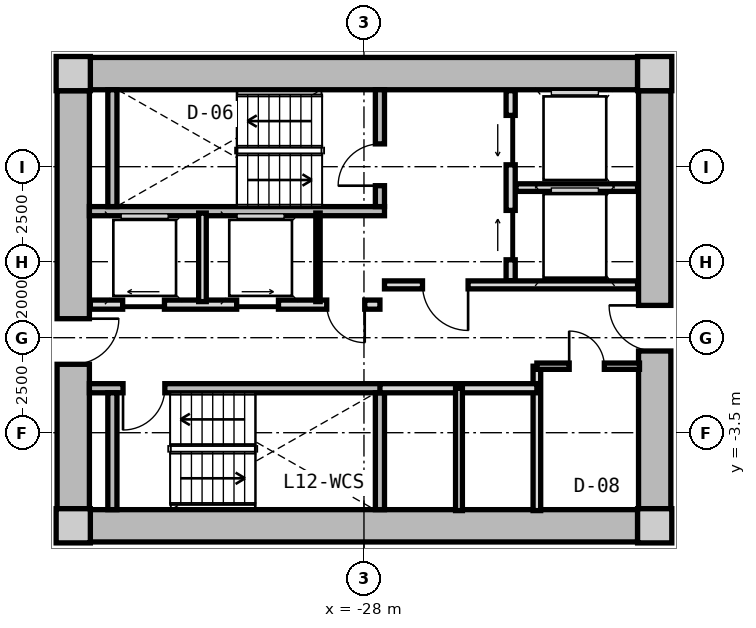
"""IFC4 building model, lengths in metres.
Left out: names, types, materials, properties, quantities, classifications, styles, units other than length and angle.
Written with IfcOpenShell. Run it as: python <this file> out.ifc"""

import sys

from ifc_helpers import new_model, si_unit, direction, frame, frame_2d, origin, origin_2d, place, context, subcontext, project, spatial, rectangle, extrude, source, transform, mapped, element, fill, save


model = new_model("IFC4")
c1 = context("Model", 3, precision=1e-05, world=origin(), true_north=direction((0.0, 1.0)))
c2 = subcontext(c1, "Body", "Model", "MODEL_VIEW")
j1 = project(units=[si_unit("LENGTHUNIT", "METRE"), si_unit("PLANEANGLEUNIT", "RADIAN")], contexts=[c1])
p1 = place(None, origin())
s1 = spatial("IfcSite", under=j1, at=p1, CompositionType="ELEMENT")
p2 = place(p1, origin())
s2 = spatial("IfcBuilding", under=s1, at=p2, CompositionType="ELEMENT")
p3 = place(p2, frame((0.0, 0.0, 42.95)))
s3 = spatial("IfcBuildingStorey", under=s2, at=p3, CompositionType="ELEMENT", Elevation=42.95)
m1 = source(origin(), c2, "Body", "SweptSolid", [
    extrude(rectangle(XDim=0.9, YDim=0.9, at=origin_2d()), origin(), (0.0, 0.0, 1.0), 3.05),
])
for number, where, z_axis, x_axis in (
    (1, (-35.65, -5.95, 0.0), (0.0, 0.0, 1.0), (1.0, 0.0, 0.0)),
    (2, (-20.35, -5.95, 0.0), (0.0, 0.0, 1.0), (1.0, 0.0, 0.0)),
    (3, (-20.35, 5.95, 0.0), (0.0, 0.0, 1.0), (1.0, 0.0, 0.0)),
    (4, (-35.65, 5.95, 0.0), (0.0, 0.0, 1.0), (1.0, 0.0, 0.0)),
):
    element("IfcColumn", number, at=place(p3, frame(where, z_axis=z_axis, x_axis=x_axis)), inside=s3, PredefinedType="COLUMN", context=c2, shape_type="MappedRepresentation", body=[
        mapped(m1, transform((0.0, 0.0, 0.0), x_axis=(1.0, 0.0, 0.0), y_axis=(0.0, 1.0, 0.0), z_axis=(0.0, 0.0, 1.0), scale=1.0)),
    ])
m2 = source(origin(), c2, "Body", "SweptSolid", [
    extrude(rectangle(XDim=14.4, YDim=0.85, at=frame_2d((7.2, 0.0))), origin(), (0.0, 0.0, 1.0), 2.79),
])
for number, where, z_axis, x_axis in (
    (5, (-35.2, 5.95, 0.0), (0.0, 0.0, 1.0), (1.0, 0.0, 0.0)),
    (6, (-20.8, -5.95, 0.0), (0.0, 0.0, 1.0), (-1.0, 0.0, 0.0)),
):
    element("IfcWall", number, at=place(p3, frame(where, z_axis=z_axis, x_axis=x_axis)), inside=s3, PredefinedType="SHEAR", context=c2, shape_type="MappedRepresentation", body=[
        mapped(m2, transform((0.0, 0.0, 0.0), x_axis=(1.0, 0.0, 0.0), y_axis=(0.0, 1.0, 0.0), z_axis=(0.0, 0.0, 1.0), scale=1.0)),
    ])
m3 = source(origin(), c2, "Body", "SweptSolid", [
    extrude(rectangle(XDim=11.0, YDim=0.85, at=frame_2d((5.5, 0.0))), origin(), (0.0, 0.0, 1.0), 2.79),
])
p4 = place(p3, frame((-35.65, -5.5, 0.0), z_axis=(0.0, 0.0, 1.0), x_axis=(0.0, 1.0, 0.0)))
e7 = element("IfcWall", 7, at=p4, inside=s3, PredefinedType="SHEAR", context=c2, shape_type="MappedRepresentation", body=[
    mapped(m3, transform((0.0, 0.0, 0.0), x_axis=(1.0, 0.0, 0.0), y_axis=(0.0, 1.0, 0.0), z_axis=(0.0, 0.0, 1.0), scale=1.0)),
])
p5 = place(p4, frame((3.8, 0.0, 0.0)))
e8 = element("IfcOpeningElement", 8, at=p5, cuts=e7, PredefinedType="OPENING", context=c2, shape_type="SweptSolid", body=[
    extrude(rectangle(XDim=1.2, YDim=2.15, at=frame_2d((0.6, 1.075))), frame((0.0, 0.435, 0.0), z_axis=(0.0, -1.0, 0.0), x_axis=(1.0, 0.0, 0.0)), (0.0, 0.0, 1.0), 0.87),
])
p6 = place(p3, frame((-20.35, 5.5, 0.0), z_axis=(0.0, 0.0, 1.0), x_axis=(0.0, -1.0, 0.0)))
e9 = element("IfcWall", 9, at=p6, inside=s3, PredefinedType="SHEAR", context=c2, shape_type="MappedRepresentation", body=[
    mapped(m3, transform((0.0, 0.0, 0.0), x_axis=(1.0, 0.0, 0.0), y_axis=(0.0, 1.0, 0.0), z_axis=(0.0, 0.0, 1.0), scale=1.0)),
])
p7 = place(p6, frame((5.65, 0.0, 0.0)))
e10 = element("IfcOpeningElement", 10, at=p7, cuts=e9, PredefinedType="OPENING", context=c2, shape_type="SweptSolid", body=[
    extrude(rectangle(XDim=1.2, YDim=2.15, at=frame_2d((0.6, 1.075))), frame((0.0, 0.435, 0.0), z_axis=(0.0, -1.0, 0.0), x_axis=(1.0, 0.0, 0.0)), (0.0, 0.0, 1.0), 0.87),
])
m4 = source(origin(), c2, "Body", "SweptSolid", [
    extrude(rectangle(XDim=7.765, YDim=0.24, at=frame_2d((3.883, 0.0))), origin(), (0.0, 0.0, 1.0), 2.79),
])
p8 = place(p3, frame((-35.225, 2.33, 0.0), z_axis=(0.0, 0.0, 1.0), x_axis=(1.0, 0.0, 0.0)))
e11 = element("IfcWall", 11, at=p8, inside=s3, PredefinedType="PARTITIONING", context=c2, shape_type="MappedRepresentation", body=[
    mapped(m4, transform((0.0, 0.0, 0.0), x_axis=(1.0, 0.0, 0.0), y_axis=(0.0, 1.0, 0.0), z_axis=(0.0, 0.0, 1.0), scale=1.0)),
])
m5 = source(origin(), c2, "Body", "SweptSolid", [
    extrude(rectangle(XDim=3.075, YDim=0.24, at=frame_2d((1.538, 0.0))), origin(), (0.0, 0.0, 1.0), 2.79),
])
p9 = place(p3, frame((-34.62, 2.45, 0.0), z_axis=(0.0, 0.0, 1.0), x_axis=(0.0, 1.0, 0.0)))
e12 = element("IfcWall", 12, at=p9, inside=s3, PredefinedType="PARTITIONING", context=c2, shape_type="MappedRepresentation", body=[
    mapped(m5, transform((0.0, 0.0, 0.0), x_axis=(1.0, 0.0, 0.0), y_axis=(0.0, 1.0, 0.0), z_axis=(0.0, 0.0, 1.0), scale=1.0)),
])
p10 = place(p3, frame((-27.58, 2.45, 0.0), z_axis=(0.0, 0.0, 1.0), x_axis=(0.0, 1.0, 0.0)))
e13 = element("IfcWall", 13, at=p10, inside=s3, PredefinedType="PARTITIONING", context=c2, shape_type="MappedRepresentation", body=[
    mapped(m5, transform((0.0, 0.0, 0.0), x_axis=(1.0, 0.0, 0.0), y_axis=(0.0, 1.0, 0.0), z_axis=(0.0, 0.0, 1.0), scale=1.0)),
])
p11 = place(p10, frame((0.55, 0.0, 0.0)))
e14 = element("IfcOpeningElement", 14, at=p11, cuts=e13, PredefinedType="OPENING", context=c2, shape_type="SweptSolid", body=[
    extrude(rectangle(XDim=1.1, YDim=2.15, at=frame_2d((0.55, 1.075))), frame((0.0, 0.13, 0.0), z_axis=(0.0, -1.0, 0.0), x_axis=(1.0, 0.0, 0.0)), (0.0, 0.0, 1.0), 0.26),
])
p12 = place(p3, frame((-35.225, -2.33, 0.0), z_axis=(0.0, 0.0, 1.0), x_axis=(1.0, 0.0, 0.0)))
e15 = element("IfcWall", 15, at=p12, inside=s3, PredefinedType="PARTITIONING", context=c2, shape_type="MappedRepresentation", body=[
    mapped(m4, transform((0.0, 0.0, 0.0), x_axis=(1.0, 0.0, 0.0), y_axis=(0.0, 1.0, 0.0), z_axis=(0.0, 0.0, 1.0), scale=1.0)),
])
p13 = place(p12, frame((0.885, 0.0, 0.0)))
e16 = element("IfcOpeningElement", 16, at=p13, cuts=e15, PredefinedType="OPENING", context=c2, shape_type="SweptSolid", body=[
    extrude(rectangle(XDim=1.1, YDim=2.15, at=frame_2d((0.55, 1.075))), frame((0.0, 0.13, 0.0), z_axis=(0.0, -1.0, 0.0), x_axis=(1.0, 0.0, 0.0)), (0.0, 0.0, 1.0), 0.26),
])
for number, where, z_axis, x_axis in (
    (17, (-34.62, -5.525, 0.0), (0.0, 0.0, 1.0), (0.0, 1.0, 0.0)),
    (18, (-27.58, -5.525, 0.0), (0.0, 0.0, 1.0), (0.0, 1.0, 0.0)),
):
    element("IfcWall", number, at=place(p3, frame(where, z_axis=z_axis, x_axis=x_axis)), inside=s3, PredefinedType="PARTITIONING", context=c2, shape_type="MappedRepresentation", body=[
        mapped(m5, transform((0.0, 0.0, 0.0), x_axis=(1.0, 0.0, 0.0), y_axis=(0.0, 1.0, 0.0), z_axis=(0.0, 0.0, 1.0), scale=1.0)),
    ])
m6 = source(origin(), c2, "Body", "SweptSolid", [
    extrude(rectangle(XDim=5.0, YDim=0.24, at=frame_2d((2.5, 0.0))), origin(), (0.0, 0.0, 1.0), 2.775),
])
p14 = place(p3, frame((-24.14, 0.5, 0.0), z_axis=(0.0, 0.0, 1.0), x_axis=(0.0, 1.0, 0.0)))
e19 = element("IfcWall", 19, at=p14, inside=s3, PredefinedType="PARTITIONING", context=c2, shape_type="MappedRepresentation", body=[
    mapped(m6, transform((0.0, 0.0, 0.0), x_axis=(1.0, 0.0, 0.0), y_axis=(0.0, 1.0, 0.0), z_axis=(0.0, 0.0, 1.0), scale=1.0)),
])
p15 = place(p14, frame((3.05, 0.0, 0.0)))
e20 = element("IfcOpeningElement", 20, at=p15, cuts=e19, PredefinedType="OPENING", context=c2, shape_type="SweptSolid", body=[
    extrude(rectangle(XDim=1.3, YDim=2.2, at=frame_2d((0.65, 1.1))), frame((0.0, 0.13, 0.0), z_axis=(0.0, -1.0, 0.0), x_axis=(1.0, 0.0, 0.0)), (0.0, 0.0, 1.0), 0.26),
])
p16 = place(p14, frame((0.55, 0.0, 0.0)))
e21 = element("IfcOpeningElement", 21, at=p16, cuts=e19, PredefinedType="OPENING", context=c2, shape_type="SweptSolid", body=[
    extrude(rectangle(XDim=1.3, YDim=2.2, at=frame_2d((0.65, 1.1))), frame((0.0, 0.13, 0.0), z_axis=(0.0, -1.0, 0.0), x_axis=(1.0, 0.0, 0.0)), (0.0, 0.0, 1.0), 0.26),
])
m7 = source(origin(), c2, "Body", "SweptSolid", [
    extrude(rectangle(XDim=3.2, YDim=0.2, at=frame_2d((1.6, 0.0))), origin(), (0.0, 0.0, 1.0), 2.775),
])
p17 = place(p3, frame((-24.0, 2.95, 0.0), z_axis=(0.0, 0.0, 1.0), x_axis=(1.0, 0.0, 0.0)))
e22 = element("IfcWall", 22, at=p17, inside=s3, PredefinedType="PARTITIONING", context=c2, shape_type="MappedRepresentation", body=[
    mapped(m7, transform((0.0, 0.0, 0.0), x_axis=(1.0, 0.0, 0.0), y_axis=(0.0, 1.0, 0.0), z_axis=(0.0, 0.0, 1.0), scale=1.0)),
])
m8 = source(origin(), c2, "Body", "SweptSolid", [
    extrude(rectangle(XDim=6.66, YDim=0.21, at=frame_2d((3.33, 0.0))), origin(), (0.0, 0.0, 1.0), 2.775),
])
p18 = place(p3, frame((-27.46, 0.39, 0.0), z_axis=(0.0, 0.0, 1.0), x_axis=(1.0, 0.0, 0.0)))
e23 = element("IfcWall", 23, at=p18, inside=s3, PredefinedType="PARTITIONING", context=c2, shape_type="MappedRepresentation", body=[
    mapped(m8, transform((0.0, 0.0, 0.0), x_axis=(1.0, 0.0, 0.0), y_axis=(0.0, 1.0, 0.0), z_axis=(0.0, 0.0, 1.0), scale=1.0)),
])
p19 = place(p18, frame((1.0, 0.0, 0.0)))
e24 = element("IfcOpeningElement", 24, at=p19, cuts=e23, PredefinedType="OPENING", context=c2, shape_type="SweptSolid", body=[
    extrude(rectangle(XDim=1.2, YDim=2.15, at=frame_2d((0.6, 1.075))), frame((0.0, 0.115, 0.0), z_axis=(0.0, -1.0, 0.0), x_axis=(1.0, 0.0, 0.0)), (0.0, 0.0, 1.0), 0.23),
])
m9 = source(origin(), c2, "Body", "SweptSolid", [
    extrude(rectangle(XDim=7.62, YDim=0.24, at=frame_2d((3.81, 0.0))), origin(), (0.0, 0.0, 1.0), 2.775),
])
p20 = place(p3, frame((-35.2, -0.13, 0.0), z_axis=(0.0, 0.0, 1.0), x_axis=(1.0, 0.0, 0.0)))
e25 = element("IfcWall", 25, at=p20, inside=s3, PredefinedType="PARTITIONING", context=c2, shape_type="MappedRepresentation", body=[
    mapped(m9, transform((0.0, 0.0, 0.0), x_axis=(1.0, 0.0, 0.0), y_axis=(0.0, 1.0, 0.0), z_axis=(0.0, 0.0, 1.0), scale=1.0)),
])
p21 = place(p20, frame((6.22, 0.0, 0.0)))
e26 = element("IfcOpeningElement", 26, at=p21, cuts=e25, PredefinedType="OPENING", context=c2, shape_type="SweptSolid", body=[
    extrude(rectangle(XDim=1.0, YDim=2.1, at=frame_2d((0.5, 1.05))), frame((0.0, 0.13, 0.0), z_axis=(0.0, -1.0, 0.0), x_axis=(1.0, 0.0, 0.0)), (0.0, 0.0, 1.0), 0.26),
])
p22 = place(p20, frame((0.85, 0.0, 0.0)))
e27 = element("IfcOpeningElement", 27, at=p22, cuts=e25, PredefinedType="OPENING", context=c2, shape_type="SweptSolid", body=[
    extrude(rectangle(XDim=1.1, YDim=2.2, at=frame_2d((0.55, 1.1))), frame((0.0, 0.13, 0.0), z_axis=(0.0, -1.0, 0.0), x_axis=(1.0, 0.0, 0.0)), (0.0, 0.0, 1.0), 0.26),
])
p23 = place(p20, frame((3.85, 0.0, 0.0)))
e28 = element("IfcOpeningElement", 28, at=p23, cuts=e25, PredefinedType="OPENING", context=c2, shape_type="SweptSolid", body=[
    extrude(rectangle(XDim=1.1, YDim=2.2, at=frame_2d((0.55, 1.1))), frame((0.0, 0.13, 0.0), z_axis=(0.0, -1.0, 0.0), x_axis=(1.0, 0.0, 0.0)), (0.0, 0.0, 1.0), 0.26),
])
m10 = source(origin(), c2, "Body", "SweptSolid", [
    extrude(rectangle(XDim=2.33, YDim=0.115, at=frame_2d((1.165, 0.0))), origin(), (0.0, 0.0, 1.0), 2.775),
])
p24 = place(p3, frame((-29.21, -0.05, 0.0), z_axis=(0.0, 0.0, 1.0), x_axis=(0.0, 1.0, 0.0)))
e29 = element("IfcWall", 29, at=p24, inside=s3, PredefinedType="PARTITIONING", context=c2, shape_type="MappedRepresentation", body=[
    mapped(m10, transform((0.0, 0.0, 0.0), x_axis=(1.0, 0.0, 0.0), y_axis=(0.0, 1.0, 0.0), z_axis=(0.0, 0.0, 1.0), scale=1.0)),
])
m11 = source(origin(), c2, "Body", "SweptSolid", [
    extrude(rectangle(XDim=2.33, YDim=0.2, at=frame_2d((1.165, 0.0))), origin(), (0.0, 0.0, 1.0), 2.775),
])
p25 = place(p3, frame((-32.25, -0.05, 0.0), z_axis=(0.0, 0.0, 1.0), x_axis=(0.0, 1.0, 0.0)))
e30 = element("IfcWall", 30, at=p25, inside=s3, PredefinedType="PARTITIONING", context=c2, shape_type="MappedRepresentation", body=[
    mapped(m11, transform((0.0, 0.0, 0.0), x_axis=(1.0, 0.0, 0.0), y_axis=(0.0, 1.0, 0.0), z_axis=(0.0, 0.0, 1.0), scale=1.0)),
])
m12 = source(origin(), c2, "Body", "SweptSolid", [
    extrude(rectangle(XDim=3.8, YDim=0.2, at=frame_2d((1.9, 0.0))), origin(), (0.0, 0.0, 1.0), 2.775),
])
p26 = place(p3, frame((-23.45, -5.55, 0.0), z_axis=(0.0, 0.0, 1.0), x_axis=(0.0, 1.0, 0.0)))
e31 = element("IfcWall", 31, at=p26, inside=s3, PredefinedType="PARTITIONING", context=c2, shape_type="MappedRepresentation", body=[
    mapped(m12, transform((0.0, 0.0, 0.0), x_axis=(1.0, 0.0, 0.0), y_axis=(0.0, 1.0, 0.0), z_axis=(0.0, 0.0, 1.0), scale=1.0)),
])
m13 = source(origin(), c2, "Body", "SweptSolid", [
    extrude(rectangle(XDim=4.13, YDim=0.24, at=frame_2d((2.065, 0.0))), origin(), (0.0, 0.0, 1.0), 2.775),
])
p27 = place(p3, frame((-27.58, -2.33, 0.0), z_axis=(0.0, 0.0, 1.0), x_axis=(1.0, 0.0, 0.0)))
e32 = element("IfcWall", 32, at=p27, inside=s3, PredefinedType="PARTITIONING", context=c2, shape_type="MappedRepresentation", body=[
    mapped(m13, transform((0.0, 0.0, 0.0), x_axis=(1.0, 0.0, 0.0), y_axis=(0.0, 1.0, 0.0), z_axis=(0.0, 0.0, 1.0), scale=1.0)),
])
m14 = source(origin(), c2, "Body", "SweptSolid", [
    extrude(rectangle(XDim=3.22, YDim=0.18, at=frame_2d((1.61, 0.0))), origin(), (0.0, 0.0, 1.0), 2.775),
])
p28 = place(p3, frame((-25.5, -5.55, 0.0), z_axis=(0.0, 0.0, 1.0), x_axis=(0.0, 1.0, 0.0)))
e33 = element("IfcWall", 33, at=p28, inside=s3, PredefinedType="PARTITIONING", context=c2, shape_type="MappedRepresentation", body=[
    mapped(m14, transform((0.0, 0.0, 0.0), x_axis=(1.0, 0.0, 0.0), y_axis=(0.0, 1.0, 0.0), z_axis=(0.0, 0.0, 1.0), scale=1.0)),
])
m15 = source(origin(), c2, "Body", "SweptSolid", [
    extrude(rectangle(XDim=2.7, YDim=0.165, at=frame_2d((1.35, 0.0))), origin(), (0.0, 0.0, 1.0), 2.775),
])
p29 = place(p3, frame((-23.45, -1.75, 0.0), z_axis=(0.0, 0.0, 1.0), x_axis=(1.0, 0.0, 0.0)))
e34 = element("IfcWall", 34, at=p29, inside=s3, PredefinedType="PARTITIONING", context=c2, shape_type="MappedRepresentation", body=[
    mapped(m15, transform((0.0, 0.0, 0.0), x_axis=(1.0, 0.0, 0.0), y_axis=(0.0, 1.0, 0.0), z_axis=(0.0, 0.0, 1.0), scale=1.0)),
])
p30 = place(p29, frame((0.85, 0.0, 0.0)))
e35 = element("IfcOpeningElement", 35, at=p30, cuts=e34, PredefinedType="OPENING", context=c2, shape_type="SweptSolid", body=[
    extrude(rectangle(XDim=0.925, YDim=2.1, at=frame_2d((0.462, 1.05))), frame((0.0, 0.093, 0.0), z_axis=(0.0, -1.0, 0.0), x_axis=(1.0, 0.0, 0.0)), (0.0, 0.0, 1.0), 0.185),
])
m16 = source(origin(), c2, "Body", "SweptSolid", [
    extrude(rectangle(XDim=1.1, YDim=2.15, at=frame_2d((0.55, 1.075))), frame((0.0, 0.025, 0.0), z_axis=(0.0, -1.0, 0.0), x_axis=(1.0, 0.0, 0.0)), (0.0, 0.0, 1.0), 0.05),
])
p31 = place(p11, origin())
e36 = element("IfcDoor", 36, at=p31, inside=s3, OperationType="SINGLE_SWING_LEFT", PredefinedType="DOOR", context=c2, shape_type="MappedRepresentation", body=[
    mapped(m16, transform((0.0, 0.0, 0.0), x_axis=(1.0, 0.0, 0.0), y_axis=(0.0, 1.0, 0.0), z_axis=(0.0, 0.0, 1.0), scale=1.0)),
])
fill(e14, e36)
p32 = place(p13, frame((1.1, 0.0, 0.0), z_axis=(0.0, 0.0, 1.0), x_axis=(-1.0, 0.0, 0.0)))
e37 = element("IfcDoor", 37, at=p32, inside=s3, OperationType="SINGLE_SWING_RIGHT", PredefinedType="DOOR", context=c2, shape_type="MappedRepresentation", body=[
    mapped(m16, transform((0.0, 0.0, 0.0), x_axis=(1.0, 0.0, 0.0), y_axis=(0.0, 1.0, 0.0), z_axis=(0.0, 0.0, 1.0), scale=1.0)),
])
fill(e16, e37)
m17 = source(origin(), c2, "Body", "SweptSolid", [
    extrude(rectangle(XDim=1.3, YDim=2.2, at=frame_2d((0.65, 1.1))), frame((0.0, 0.025, 0.0), z_axis=(0.0, -1.0, 0.0), x_axis=(1.0, 0.0, 0.0)), (0.0, 0.0, 1.0), 0.05),
])
p33 = place(p15, origin())
e38 = element("IfcDoor", 38, at=p33, inside=s3, OperationType="SLIDING_TO_LEFT", PredefinedType="DOOR", context=c2, shape_type="MappedRepresentation", body=[
    mapped(m17, transform((0.0, 0.0, 0.0), x_axis=(1.0, 0.0, 0.0), y_axis=(0.0, 1.0, 0.0), z_axis=(0.0, 0.0, 1.0), scale=1.0)),
])
fill(e20, e38)
p34 = place(p16, origin())
e39 = element("IfcDoor", 39, at=p34, inside=s3, OperationType="SLIDING_TO_RIGHT", PredefinedType="DOOR", context=c2, shape_type="MappedRepresentation", body=[
    mapped(m17, transform((0.0, 0.0, 0.0), x_axis=(1.0, 0.0, 0.0), y_axis=(0.0, 1.0, 0.0), z_axis=(0.0, 0.0, 1.0), scale=1.0)),
])
fill(e21, e39)
m18 = source(origin(), c2, "Body", "SweptSolid", [
    extrude(rectangle(XDim=1.2, YDim=2.15, at=frame_2d((0.6, 1.075))), frame((0.0, 0.025, 0.0), z_axis=(0.0, -1.0, 0.0), x_axis=(1.0, 0.0, 0.0)), (0.0, 0.0, 1.0), 0.05),
])
p35 = place(p19, frame((1.2, 0.0, 0.0), z_axis=(0.0, 0.0, 1.0), x_axis=(-1.0, 0.0, 0.0)))
e40 = element("IfcDoor", 40, at=p35, inside=s3, OperationType="SINGLE_SWING_LEFT", PredefinedType="DOOR", context=c2, shape_type="MappedRepresentation", body=[
    mapped(m18, transform((0.0, 0.0, 0.0), x_axis=(1.0, 0.0, 0.0), y_axis=(0.0, 1.0, 0.0), z_axis=(0.0, 0.0, 1.0), scale=1.0)),
])
fill(e24, e40)
p36 = place(p5, frame((1.2, 0.0, 0.0), z_axis=(0.0, 0.0, 1.0), x_axis=(-1.0, 0.0, 0.0)))
e41 = element("IfcDoor", 41, at=p36, inside=s3, OperationType="SINGLE_SWING_LEFT", PredefinedType="DOOR", context=c2, shape_type="MappedRepresentation", body=[
    mapped(m18, transform((0.0, 0.0, 0.0), x_axis=(1.0, 0.0, 0.0), y_axis=(0.0, 1.0, 0.0), z_axis=(0.0, 0.0, 1.0), scale=1.0)),
])
fill(e8, e41)
p37 = place(p7, frame((1.2, 0.0, 0.0), z_axis=(0.0, 0.0, 1.0), x_axis=(-1.0, 0.0, 0.0)))
e42 = element("IfcDoor", 42, at=p37, inside=s3, OperationType="SINGLE_SWING_RIGHT", PredefinedType="DOOR", context=c2, shape_type="MappedRepresentation", body=[
    mapped(m18, transform((0.0, 0.0, 0.0), x_axis=(1.0, 0.0, 0.0), y_axis=(0.0, 1.0, 0.0), z_axis=(0.0, 0.0, 1.0), scale=1.0)),
])
fill(e10, e42)
m19 = source(origin(), c2, "Body", "SweptSolid", [
    extrude(rectangle(XDim=1.0, YDim=2.1, at=frame_2d((0.5, 1.05))), frame((0.0, 0.025, 0.0), z_axis=(0.0, -1.0, 0.0), x_axis=(1.0, 0.0, 0.0)), (0.0, 0.0, 1.0), 0.05),
])
p38 = place(p21, frame((1.0, 0.0, 0.0), z_axis=(0.0, 0.0, 1.0), x_axis=(-1.0, 0.0, 0.0)))
e43 = element("IfcDoor", 43, at=p38, inside=s3, OperationType="SINGLE_SWING_LEFT", PredefinedType="DOOR", context=c2, shape_type="MappedRepresentation", body=[
    mapped(m19, transform((0.0, 0.0, 0.0), x_axis=(1.0, 0.0, 0.0), y_axis=(0.0, 1.0, 0.0), z_axis=(0.0, 0.0, 1.0), scale=1.0)),
])
fill(e26, e43)
m20 = source(origin(), c2, "Body", "SweptSolid", [
    extrude(rectangle(XDim=1.1, YDim=2.2, at=frame_2d((0.55, 1.1))), frame((0.0, 0.025, 0.0), z_axis=(0.0, -1.0, 0.0), x_axis=(1.0, 0.0, 0.0)), (0.0, 0.0, 1.0), 0.05),
])
p39 = place(p22, origin())
e44 = element("IfcDoor", 44, at=p39, inside=s3, OperationType="SLIDING_TO_LEFT", PredefinedType="DOOR", context=c2, shape_type="MappedRepresentation", body=[
    mapped(m20, transform((0.0, 0.0, 0.0), x_axis=(1.0, 0.0, 0.0), y_axis=(0.0, 1.0, 0.0), z_axis=(0.0, 0.0, 1.0), scale=1.0)),
])
fill(e27, e44)
p40 = place(p23, origin())
e45 = element("IfcDoor", 45, at=p40, inside=s3, OperationType="SLIDING_TO_RIGHT", PredefinedType="DOOR", context=c2, shape_type="MappedRepresentation", body=[
    mapped(m20, transform((0.0, 0.0, 0.0), x_axis=(1.0, 0.0, 0.0), y_axis=(0.0, 1.0, 0.0), z_axis=(0.0, 0.0, 1.0), scale=1.0)),
])
fill(e28, e45)
m21 = source(origin(), c2, "Body", "SweptSolid", [
    extrude(rectangle(XDim=0.925, YDim=2.1, at=frame_2d((0.462, 1.05))), frame((0.0, 0.025, 0.0), z_axis=(0.0, -1.0, 0.0), x_axis=(1.0, 0.0, 0.0)), (0.0, 0.0, 1.0), 0.05),
])
p41 = place(p30, origin())
e46 = element("IfcDoor", 46, at=p41, inside=s3, OperationType="SINGLE_SWING_LEFT", PredefinedType="DOOR", context=c2, shape_type="MappedRepresentation", body=[
    mapped(m21, transform((0.0, 0.0, 0.0), x_axis=(1.0, 0.0, 0.0), y_axis=(0.0, 1.0, 0.0), z_axis=(0.0, 0.0, 1.0), scale=1.0)),
])
fill(e35, e46)
save(model, sys.argv[1])
